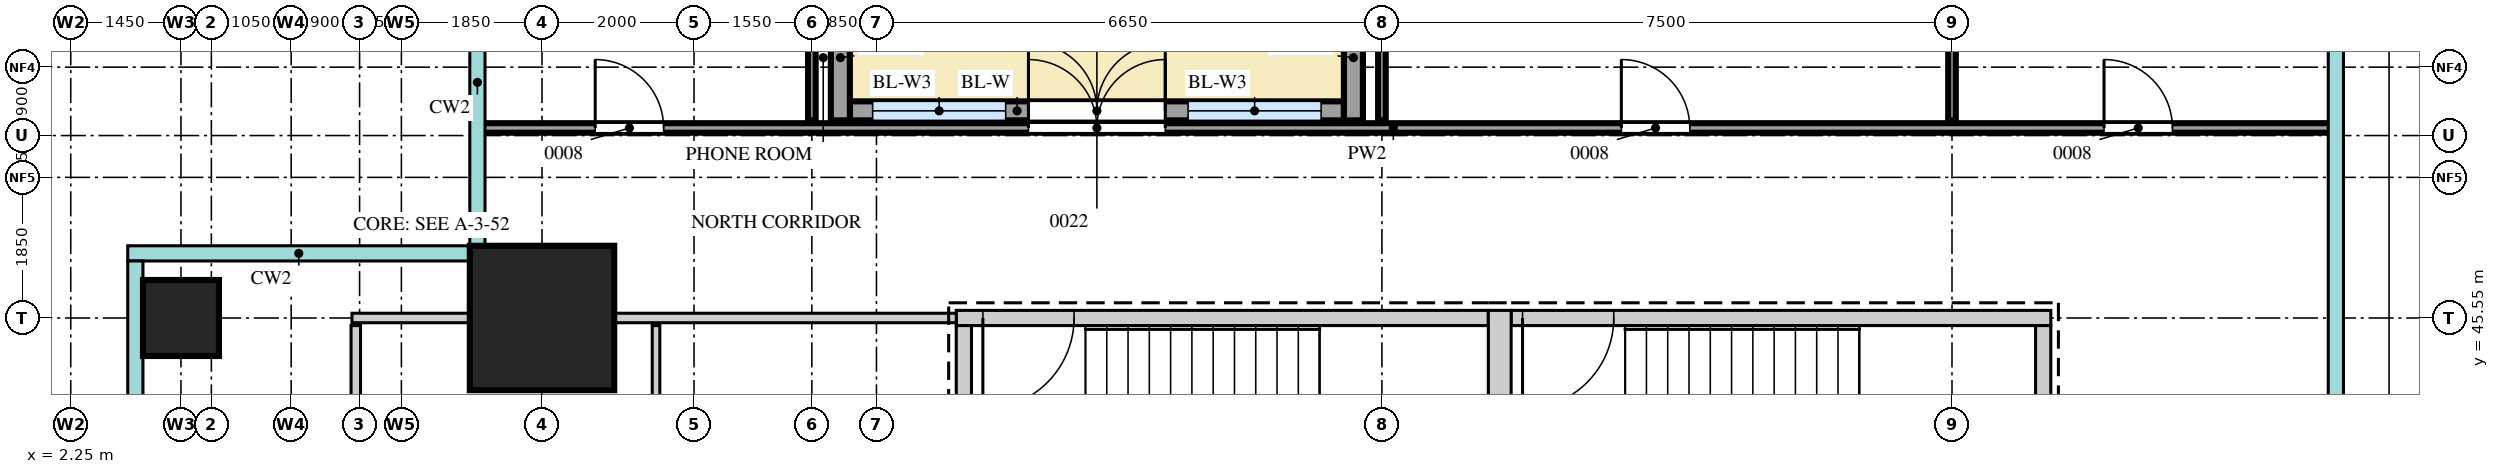
"""IFC4 building model, lengths in metres.
Left out: names, types, materials, properties, quantities, classifications, styles, units other than length and angle.
Written with IfcOpenShell. Run it as: python <this file> out.ifc"""

import sys

from ifc_helpers import new_model, si_unit, direction, frame, frame_2d, origin, origin_2d, place, context, subcontext, project, spatial, rectangle, extrude, source, transform, mapped, element, fill, save


model = new_model("IFC4")
c1 = context("Model", 3, precision=1e-05, world=origin(), true_north=direction((0.0, 1.0)))
c2 = subcontext(c1, "Body", "Model", "MODEL_VIEW")
j1 = project(units=[si_unit("LENGTHUNIT", "METRE"), si_unit("PLANEANGLEUNIT", "RADIAN")], contexts=[c1])
p1 = place(None, origin())
s1 = spatial("IfcSite", under=j1, at=p1, CompositionType="ELEMENT")
p2 = place(p1, origin())
s2 = spatial("IfcBuilding", under=s1, at=p2, CompositionType="ELEMENT")
p3 = place(p2, frame((0.0, 0.0, 172.7)))
s3 = spatial("IfcBuildingStorey", under=s2, at=p3, CompositionType="ELEMENT", Elevation=172.7)
m1 = source(origin(), c2, "Body", "SweptSolid", [
    extrude(rectangle(XDim=7.0, YDim=0.2, at=frame_2d((3.5, 0.0))), origin(), (0.0, 0.0, 1.0), 3.75),
])
p4 = place(p3, frame((13.9, 45.55, 0.0), z_axis=(0.0, 0.0, 1.0), x_axis=(1.0, 0.0, 0.0)))
e1 = element("IfcWall", 1, at=p4, inside=s3, PredefinedType="SHEAR", context=c2, shape_type="MappedRepresentation", body=[
    mapped(m1, transform((0.0, 0.0, 0.0))),
])
m2 = source(origin(), c2, "Body", "SweptSolid", [
    extrude(rectangle(XDim=1.2, YDim=2.1, at=frame_2d((0.6, 1.05))), frame((0.0, 0.11, 0.0), z_axis=(0.0, -1.0, 0.0), x_axis=(1.0, 0.0, 0.0)), (0.0, 0.0, 1.0), 0.22),
])
p5 = place(p4, frame((0.35, 0.0, 0.0)))
e2 = element("IfcOpeningElement", 2, at=p5, cuts=e1, PredefinedType="OPENING", context=c2, shape_type="MappedRepresentation", body=[
    mapped(m2, transform((0.0, 0.0, 0.0))),
])
m3 = source(origin(), c2, "Body", "SweptSolid", [
    extrude(rectangle(XDim=7.1, YDim=0.2, at=frame_2d((3.55, 0.0))), origin(), (0.0, 0.0, 1.0), 3.75),
])
p6 = place(p3, frame((21.2, 45.55, 0.0), z_axis=(0.0, 0.0, 1.0), x_axis=(1.0, 0.0, 0.0)))
e3 = element("IfcWall", 3, at=p6, inside=s3, PredefinedType="SHEAR", context=c2, shape_type="MappedRepresentation", body=[
    mapped(m3, transform((0.0, 0.0, 0.0))),
])
p7 = place(p6, frame((0.15, 0.0, 0.0)))
e4 = element("IfcOpeningElement", 4, at=p7, cuts=e3, PredefinedType="OPENING", context=c2, shape_type="MappedRepresentation", body=[
    mapped(m2, transform((0.0, 0.0, 0.0))),
])
m4 = source(origin(), c2, "Body", "SweptSolid", [
    extrude(rectangle(XDim=3.75, YDim=0.3, at=frame_2d((1.875, 0.0))), origin(), (0.0, 0.0, 1.0), 3.75),
])
p8 = place(p3, frame((21.05, 41.9, 0.0), z_axis=(0.0, 0.0, 1.0), x_axis=(0.0, 1.0, 0.0)))
e5 = element("IfcWall", 5, at=p8, inside=s3, PredefinedType="SHEAR", context=c2, shape_type="MappedRepresentation", body=[
    mapped(m4, transform((0.0, 0.0, 0.0))),
])
m5 = source(origin(), c2, "Body", "SweptSolid", [
    extrude(rectangle(XDim=3.35, YDim=0.2, at=frame_2d((1.675, 0.0))), origin(), (0.0, 0.0, 1.0), 3.75),
])
for number, where, z_axis, x_axis in (
    (6, (14.0, 42.1, 0.0), (0.0, 0.0, 1.0), (0.0, 1.0, 0.0)),
    (7, (28.2, 42.1, 0.0), (0.0, 0.0, 1.0), (0.0, 1.0, 0.0)),
):
    element("IfcWall", number, at=place(p3, frame(where, z_axis=z_axis, x_axis=x_axis)), inside=s3, PredefinedType="SHEAR", context=c2, shape_type="MappedRepresentation", body=[
        mapped(m5, transform((0.0, 0.0, 0.0))),
    ])
m6 = source(origin(), c2, "Body", "SweptSolid", [
    extrude(rectangle(XDim=1.9, YDim=1.9, at=origin_2d()), origin(), (0.0, 0.0, 1.0), 4.0),
])
p9 = place(p3, frame((8.45, 45.55, 0.0), z_axis=(0.0, 0.0, 1.0), x_axis=(1.0, 0.0, 0.0)))
e8 = element("IfcColumn", 8, at=p9, inside=s3, PredefinedType="COLUMN", context=c2, shape_type="MappedRepresentation", body=[
    mapped(m6, transform((0.0, 0.0, 0.0))),
])
m7 = source(origin(), c2, "Body", "SweptSolid", [
    extrude(rectangle(XDim=1.0, YDim=1.0, at=origin_2d()), origin(), (0.0, 0.0, 1.0), 3.75),
])
p10 = place(p3, frame((3.7, 45.55, 0.0), z_axis=(0.0, 0.0, 1.0), x_axis=(1.0, 0.0, 0.0)))
e9 = element("IfcColumn", 9, at=p10, inside=s3, PredefinedType="COLUMN", context=c2, shape_type="MappedRepresentation", body=[
    mapped(m7, transform((0.0, 0.0, 0.0))),
])
m8 = source(origin(), c2, "Body", "SweptSolid", [
    extrude(rectangle(XDim=6.5, YDim=0.25, at=frame_2d((3.25, 0.0))), origin(), (0.0, 0.0, 1.0), 3.75),
])
p11 = place(p3, frame((12.5, 48.275, 0.0), z_axis=(0.0, 0.0, 1.0), x_axis=(1.0, 0.0, 0.0)))
e10 = element("IfcWall", 10, at=p11, inside=s3, PredefinedType="SOLIDWALL", context=c2, shape_type="MappedRepresentation", body=[
    mapped(m8, transform((0.0, 0.0, 0.0))),
])
m9 = source(origin(), c2, "Body", "SweptSolid", [
    extrude(rectangle(XDim=1.75, YDim=2.4, at=frame_2d((0.875, 1.2))), frame((0.0, 0.135, 0.0), z_axis=(0.0, -1.0, 0.0), x_axis=(1.0, 0.0, 0.0)), (0.0, 0.0, 1.0), 0.27),
])
p12 = place(p11, frame((0.3, 0.0, 0.0)))
e11 = element("IfcOpeningElement", 11, at=p12, cuts=e10, PredefinedType="OPENING", context=c2, shape_type="MappedRepresentation", body=[
    mapped(m9, transform((0.0, 0.0, 0.0))),
])
p13 = place(p11, frame((4.45, 0.0, 0.0)))
e12 = element("IfcOpeningElement", 12, at=p13, cuts=e10, PredefinedType="OPENING", context=c2, shape_type="MappedRepresentation", body=[
    mapped(m9, transform((0.0, 0.0, 0.0))),
])
m10 = source(origin(), c2, "Body", "SweptSolid", [
    extrude(rectangle(XDim=1.8, YDim=2.4, at=frame_2d((0.9, 1.2))), frame((0.0, 0.135, 0.0), z_axis=(0.0, -1.0, 0.0), x_axis=(1.0, 0.0, 0.0)), (0.0, 0.0, 1.0), 0.27),
])
p14 = place(p11, frame((2.35, 0.0, 0.0)))
e13 = element("IfcOpeningElement", 13, at=p14, cuts=e10, PredefinedType="OPENING", context=c2, shape_type="MappedRepresentation", body=[
    mapped(m10, transform((0.0, 0.0, 0.0))),
])
m11 = source(origin(), c2, "Body", "SweptSolid", [
    extrude(rectangle(XDim=1.65, YDim=0.25, at=frame_2d((0.825, 0.0))), origin(), (0.0, 0.0, 1.0), 3.45),
])
for number, where, z_axis, x_axis in (
    (14, (12.375, 49.8, 0.0), (0.0, 0.0, 1.0), (0.0, -1.0, 0.0)),
    (15, (19.125, 49.8, 0.0), (0.0, 0.0, 1.0), (0.0, -1.0, 0.0)),
):
    element("IfcWall", number, at=place(p3, frame(where, z_axis=z_axis, x_axis=x_axis)), inside=s3, PredefinedType="SOLIDWALL", context=c2, shape_type="MappedRepresentation", body=[
        mapped(m11, transform((0.0, 0.0, 0.0))),
    ])
m12 = source(origin(), c2, "Body", "SweptSolid", [
    extrude(rectangle(XDim=3.45, YDim=0.125, at=frame_2d((1.725, 0.0))), origin(), (0.0, 0.0, 1.0), 3.8),
])
p15 = place(p3, frame((6.0, 42.0, 0.0), z_axis=(0.0, 0.0, 1.0), x_axis=(0.0, 1.0, 0.0)))
e16 = element("IfcWall", 16, at=p15, inside=s3, PredefinedType="PARTITIONING", context=c2, shape_type="MappedRepresentation", body=[
    mapped(m12, transform((0.0, 0.0, 0.0))),
])
m13 = source(origin(), c2, "Body", "SweptSolid", [
    extrude(rectangle(XDim=3.45, YDim=0.1, at=frame_2d((1.725, 0.0))), origin(), (0.0, 0.0, 1.0), 3.8),
])
p16 = place(p3, frame((9.95, 42.0, 0.0), z_axis=(0.0, 0.0, 1.0), x_axis=(0.0, 1.0, 0.0)))
e17 = element("IfcWall", 17, at=p16, inside=s3, PredefinedType="PARTITIONING", context=c2, shape_type="MappedRepresentation", body=[
    mapped(m13, transform((0.0, 0.0, 0.0))),
])
m14 = source(origin(), c2, "Body", "SweptSolid", [
    extrude(rectangle(XDim=7.95, YDim=0.125, at=frame_2d((3.975, 0.0))), origin(), (0.0, 0.0, 1.0), 3.25),
])
p17 = place(p3, frame((5.95, 45.55, 0.0), z_axis=(0.0, 0.0, 1.0), x_axis=(1.0, 0.0, 0.0)))
e18 = element("IfcWall", 18, at=p17, inside=s3, PredefinedType="PARTITIONING", context=c2, shape_type="MappedRepresentation", body=[
    mapped(m14, transform((0.0, 0.0, 0.0))),
])
m15 = source(origin(), c2, "Body", "SweptSolid", [
    extrude(rectangle(XDim=24.35, YDim=0.125, at=frame_2d((12.175, 0.0))), origin(), (0.0, 0.0, 1.0), 3.8),
])
p18 = place(p3, frame((7.65, 48.05, 0.0), z_axis=(0.0, 0.0, 1.0), x_axis=(1.0, 0.0, 0.0)))
e19 = element("IfcWall", 19, at=p18, inside=s3, PredefinedType="PARTITIONING", context=c2, shape_type="MappedRepresentation", body=[
    mapped(m15, transform((0.0, 0.0, 0.0))),
])
m16 = source(origin(), c2, "Body", "SweptSolid", [
    extrude(rectangle(XDim=0.9, YDim=2.1, at=frame_2d((0.45, 1.05))), frame((0.0, 0.073, 0.0), z_axis=(0.0, -1.0, 0.0), x_axis=(1.0, 0.0, 0.0)), (0.0, 0.0, 1.0), 0.145),
])
p19 = place(p18, frame((1.5, 0.0, 0.0)))
e20 = element("IfcOpeningElement", 20, at=p19, cuts=e19, PredefinedType="OPENING", context=c2, shape_type="MappedRepresentation", body=[
    mapped(m16, transform((0.0, 0.0, 0.0))),
])
m17 = source(origin(), c2, "Body", "SweptSolid", [
    extrude(rectangle(XDim=1.8, YDim=2.1, at=frame_2d((0.9, 1.05))), frame((0.0, 0.073, 0.0), z_axis=(0.0, -1.0, 0.0), x_axis=(1.0, 0.0, 0.0)), (0.0, 0.0, 1.0), 0.145),
])
p20 = place(p18, frame((7.2, 0.0, 0.0)))
e21 = element("IfcOpeningElement", 21, at=p20, cuts=e19, PredefinedType="OPENING", context=c2, shape_type="MappedRepresentation", body=[
    mapped(m17, transform((0.0, 0.0, 0.0))),
])
p21 = place(p18, frame((15.0, 0.0, 0.0)))
e22 = element("IfcOpeningElement", 22, at=p21, cuts=e19, PredefinedType="OPENING", context=c2, shape_type="MappedRepresentation", body=[
    mapped(m16, transform((0.0, 0.0, 0.0))),
])
p22 = place(p18, frame((21.35, 0.0, 0.0)))
e23 = element("IfcOpeningElement", 23, at=p22, cuts=e19, PredefinedType="OPENING", context=c2, shape_type="MappedRepresentation", body=[
    mapped(m16, transform((0.0, 0.0, 0.0))),
])
m18 = source(origin(), c2, "Body", "SweptSolid", [
    extrude(rectangle(XDim=2.7, YDim=0.1, at=frame_2d((1.35, 0.0))), origin(), (0.0, 0.0, 1.0), 3.25),
])
p23 = place(p3, frame((12.0, 48.15, 0.0), z_axis=(0.0, 0.0, 1.0), x_axis=(0.0, 1.0, 0.0)))
e24 = element("IfcWall", 24, at=p23, inside=s3, PredefinedType="PARTITIONING", context=c2, shape_type="MappedRepresentation", body=[
    mapped(m18, transform((0.0, 0.0, 0.0))),
])
m19 = source(origin(), c2, "Body", "SweptSolid", [
    extrude(rectangle(XDim=2.7, YDim=0.1, at=frame_2d((1.35, 0.0))), origin(), (0.0, 0.0, 1.0), 3.42),
])
for number, where, z_axis, x_axis in (
    (25, (19.5, 48.15, 0.0), (0.0, 0.0, 1.0), (0.0, 1.0, 0.0)),
    (26, (27.0, 48.15, 0.0), (0.0, 0.0, 1.0), (0.0, 1.0, 0.0)),
):
    element("IfcWall", number, at=place(p3, frame(where, z_axis=z_axis, x_axis=x_axis)), inside=s3, PredefinedType="PARTITIONING", context=c2, shape_type="MappedRepresentation", body=[
        mapped(m19, transform((0.0, 0.0, 0.0))),
    ])
m20 = source(origin(), c2, "Body", "SweptSolid", [
    extrude(rectangle(XDim=1.75, YDim=2.4, at=frame_2d((0.875, 1.2))), frame((0.0, 0.03, 0.0), z_axis=(0.0, -1.0, 0.0), x_axis=(1.0, 0.0, 0.0)), (0.0, 0.0, 1.0), 0.06),
])
p24 = place(p12, origin())
e27 = element("IfcWindow", 27, at=p24, inside=s3, PartitioningType="SINGLE_PANEL", PredefinedType="WINDOW", context=c2, shape_type="MappedRepresentation", body=[
    mapped(m20, transform((0.0, 0.0, 0.0))),
])
fill(e11, e27)
p25 = place(p13, origin())
e28 = element("IfcWindow", 28, at=p25, inside=s3, PartitioningType="SINGLE_PANEL", PredefinedType="WINDOW", context=c2, shape_type="MappedRepresentation", body=[
    mapped(m20, transform((0.0, 0.0, 0.0))),
])
fill(e12, e28)
m21 = source(origin(), c2, "Body", "SweptSolid", [
    extrude(rectangle(XDim=1.8, YDim=2.4, at=frame_2d((0.9, 1.2))), frame((0.0, 0.025, 0.0), z_axis=(0.0, -1.0, 0.0), x_axis=(1.0, 0.0, 0.0)), (0.0, 0.0, 1.0), 0.05),
])
p26 = place(p14, origin())
e29 = element("IfcDoor", 29, at=p26, inside=s3, OperationType="DOUBLE_DOOR_DOUBLE_SWING", PredefinedType="DOOR", context=c2, shape_type="MappedRepresentation", body=[
    mapped(m21, transform((0.0, 0.0, 0.0))),
])
fill(e13, e29)
m22 = source(origin(), c2, "Body", "SweptSolid", [
    extrude(rectangle(XDim=0.9, YDim=2.1, at=frame_2d((0.45, 1.05))), frame((0.0, 0.025, 0.0), z_axis=(0.0, -1.0, 0.0), x_axis=(1.0, 0.0, 0.0)), (0.0, 0.0, 1.0), 0.05),
])
p27 = place(p19, origin())
e30 = element("IfcDoor", 30, at=p27, inside=s3, OperationType="SINGLE_SWING_RIGHT", PredefinedType="DOOR", context=c2, shape_type="MappedRepresentation", body=[
    mapped(m22, transform((0.0, 0.0, 0.0))),
])
fill(e20, e30)
m23 = source(origin(), c2, "Body", "SweptSolid", [
    extrude(rectangle(XDim=1.8, YDim=2.1, at=frame_2d((0.9, 1.05))), frame((0.0, 0.025, 0.0), z_axis=(0.0, -1.0, 0.0), x_axis=(1.0, 0.0, 0.0)), (0.0, 0.0, 1.0), 0.05),
])
p28 = place(p20, origin())
e31 = element("IfcDoor", 31, at=p28, inside=s3, OperationType="DOUBLE_DOOR_SINGLE_SWING", PredefinedType="DOOR", context=c2, shape_type="MappedRepresentation", body=[
    mapped(m23, transform((0.0, 0.0, 0.0))),
])
fill(e21, e31)
p29 = place(p21, origin())
e32 = element("IfcDoor", 32, at=p29, inside=s3, OperationType="SINGLE_SWING_RIGHT", PredefinedType="DOOR", context=c2, shape_type="MappedRepresentation", body=[
    mapped(m22, transform((0.0, 0.0, 0.0))),
])
fill(e22, e32)
p30 = place(p22, origin())
e33 = element("IfcDoor", 33, at=p30, inside=s3, OperationType="SINGLE_SWING_RIGHT", PredefinedType="DOOR", context=c2, shape_type="MappedRepresentation", body=[
    mapped(m22, transform((0.0, 0.0, 0.0))),
])
fill(e23, e33)
m24 = source(origin(), c2, "Body", "SweptSolid", [
    extrude(rectangle(XDim=1.2, YDim=2.1, at=frame_2d((0.6, 1.05))), frame((0.0, 0.025, 0.0), z_axis=(0.0, -1.0, 0.0), x_axis=(1.0, 0.0, 0.0)), (0.0, 0.0, 1.0), 0.05),
])
p31 = place(p5, origin())
e34 = element("IfcDoor", 34, at=p31, inside=s3, OperationType="SINGLE_SWING_LEFT", PredefinedType="DOOR", context=c2, shape_type="MappedRepresentation", body=[
    mapped(m24, transform((0.0, 0.0, 0.0))),
])
fill(e2, e34)
p32 = place(p7, origin())
e35 = element("IfcDoor", 35, at=p32, inside=s3, OperationType="SINGLE_SWING_LEFT", PredefinedType="DOOR", context=c2, shape_type="MappedRepresentation", body=[
    mapped(m24, transform((0.0, 0.0, 0.0))),
])
fill(e4, e35)
save(model, sys.argv[1])
